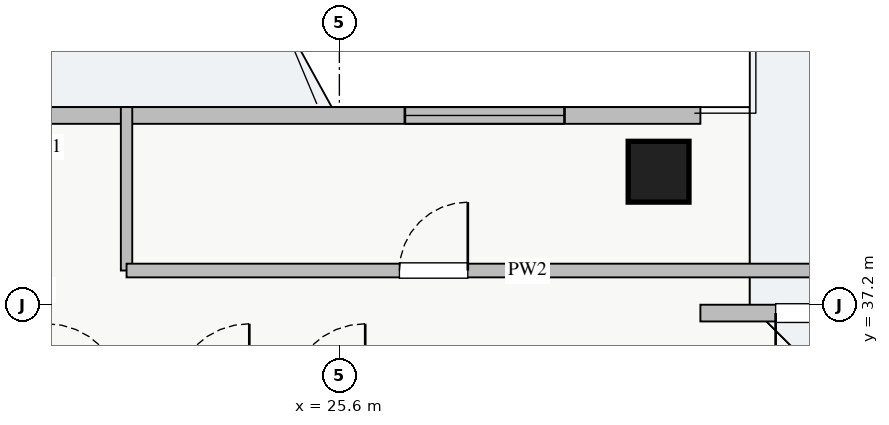
"""IFC4 building model, lengths in metres.
Left out: names, types, materials, properties, quantities, classifications, styles, units other than length and angle.
Written with IfcOpenShell. Run it as: python <this file> out.ifc"""

import sys

from ifc_helpers import new_model, si_unit, direction, frame, frame_2d, origin, origin_2d, place, context, subcontext, project, spatial, rectangle, extrude, source, transform, mapped, element, fill, save


model = new_model("IFC4")
c1 = context("Model", 3, precision=1e-05, world=origin(), true_north=direction((0.0, 1.0)))
c2 = subcontext(c1, "Body", "Model", "MODEL_VIEW")
j1 = project(units=[si_unit("LENGTHUNIT", "METRE"), si_unit("PLANEANGLEUNIT", "RADIAN")], contexts=[c1])
p1 = place(None, origin())
s1 = spatial("IfcSite", under=j1, at=p1, CompositionType="ELEMENT")
p2 = place(p1, origin())
s2 = spatial("IfcBuilding", under=s1, at=p2, CompositionType="ELEMENT")
p3 = place(p2, frame((0.0, 0.0, 223.0)))
s3 = spatial("IfcBuildingStorey", under=s2, at=p3, CompositionType="ELEMENT", Elevation=223.0)
m1 = source(origin(), c2, "Body", "SweptSolid", [
    extrude(rectangle(XDim=0.8, YDim=0.8, at=origin_2d()), origin(), (0.0, 0.0, 1.0), 3.25),
])
p4 = place(p3, frame((29.8, 38.95, 0.0), z_axis=(0.0, 0.0, 1.0), x_axis=(1.0, 0.0, 0.0)))
e1 = element("IfcColumn", 1, at=p4, inside=s3, PredefinedType="COLUMN", context=c2, shape_type="MappedRepresentation", body=[
    mapped(m1, transform((0.0, 0.0, 0.0), x_axis=(1.0, 0.0, 0.0), y_axis=(0.0, 1.0, 0.0), z_axis=(0.0, 0.0, 1.0), scale=1.0)),
])
p5 = place(p3, frame((7.65, 39.69, 0.0), z_axis=(0.0, 0.0, 1.0), x_axis=(1.0, 0.0, 0.0)))
e2 = element("IfcWall", 2, at=p5, inside=s3, PredefinedType="STANDARD", context=c2, shape_type="SweptSolid", body=[
    extrude(rectangle(XDim=22.7, YDim=0.22, at=frame_2d((11.35, 0.0))), origin(), (0.0, 0.0, 1.0), 2.61),
])
p6 = place(p5, frame((12.2, 0.0, 0.0)))
e3 = element("IfcOpeningElement", 3, at=p6, cuts=e2, PredefinedType="OPENING", context=c2, shape_type="SweptSolid", body=[
    extrude(rectangle(XDim=1.2, YDim=2.1, at=frame_2d((0.6, 1.05))), frame((0.0, 0.12, 0.0), z_axis=(0.0, -1.0, 0.0), x_axis=(1.0, 0.0, 0.0)), (0.0, 0.0, 1.0), 0.24),
])
p7 = place(p5, frame((1.637, 0.0, 0.9)))
e4 = element("IfcOpeningElement", 4, at=p7, cuts=e2, PredefinedType="OPENING", context=c2, shape_type="SweptSolid", body=[
    extrude(rectangle(XDim=2.4, YDim=1.48, at=frame_2d((1.2, 0.74))), frame((0.0, 0.12, 0.0), z_axis=(0.0, -1.0, 0.0), x_axis=(1.0, 0.0, 0.0)), (0.0, 0.0, 1.0), 0.24),
])
p8 = place(p5, frame((7.612, 0.0, 0.9)))
e5 = element("IfcOpeningElement", 5, at=p8, cuts=e2, PredefinedType="OPENING", context=c2, shape_type="SweptSolid", body=[
    extrude(rectangle(XDim=1.8, YDim=1.45, at=frame_2d((0.9, 0.725))), frame((0.0, 0.12, 0.0), z_axis=(0.0, -1.0, 0.0), x_axis=(1.0, 0.0, 0.0)), (0.0, 0.0, 1.0), 0.24),
])
p9 = place(p5, frame((18.812, 0.0, 0.9)))
e6 = element("IfcOpeningElement", 6, at=p9, cuts=e2, PredefinedType="OPENING", context=c2, shape_type="SweptSolid", body=[
    extrude(rectangle(XDim=2.1, YDim=1.48, at=frame_2d((1.05, 0.74))), frame((0.0, 0.12, 0.0), z_axis=(0.0, -1.0, 0.0), x_axis=(1.0, 0.0, 0.0)), (0.0, 0.0, 1.0), 0.24),
])
p10 = place(p3, frame((30.35, 37.09, 0.0), z_axis=(0.0, 0.0, 1.0), x_axis=(1.0, 0.0, 0.0)))
e7 = element("IfcWall", 7, at=p10, inside=s3, PredefinedType="STANDARD", context=c2, shape_type="SweptSolid", body=[
    extrude(rectangle(XDim=2.74, YDim=0.22, at=frame_2d((1.37, 0.0))), origin(), (0.0, 0.0, 1.0), 2.61),
])
p11 = place(p10, frame((0.99, 0.0, 0.0)))
e8 = element("IfcOpeningElement", 8, at=p11, cuts=e7, PredefinedType="OPENING", context=c2, shape_type="SweptSolid", body=[
    extrude(rectangle(XDim=1.2, YDim=2.1, at=frame_2d((0.6, 1.05))), frame((0.0, 0.12, 0.0), z_axis=(0.0, -1.0, 0.0), x_axis=(1.0, 0.0, 0.0)), (0.0, 0.0, 1.0), 0.24),
])
p12 = place(p3, frame((22.8, 37.65, 0.0), z_axis=(0.0, 0.0, 1.0), x_axis=(0.0, 1.0, 0.0)))
e9 = element("IfcWall", 9, at=p12, inside=s3, PredefinedType="PARTITIONING", context=c2, shape_type="SweptSolid", body=[
    extrude(rectangle(XDim=2.15, YDim=0.15, at=frame_2d((1.075, 0.0))), origin(), (0.0, 0.0, 1.0), 3.07),
])
p13 = place(p3, frame((22.8, 37.65, 0.0), z_axis=(0.0, 0.0, 1.0), x_axis=(1.0, 0.0, 0.0)))
e10 = element("IfcWall", 10, at=p13, inside=s3, PredefinedType="PARTITIONING", context=c2, shape_type="SweptSolid", body=[
    extrude(rectangle(XDim=9.65, YDim=0.18, at=frame_2d((4.825, 0.0))), origin(), (0.0, 0.0, 1.0), 3.07),
])
p14 = place(p13, frame((3.59, 0.0, 0.0)))
e11 = element("IfcOpeningElement", 11, at=p14, cuts=e10, PredefinedType="OPENING", context=c2, shape_type="SweptSolid", body=[
    extrude(rectangle(XDim=0.9, YDim=2.05, at=frame_2d((0.45, 1.025))), frame((0.0, 0.1, 0.0), z_axis=(0.0, -1.0, 0.0), x_axis=(1.0, 0.0, 0.0)), (0.0, 0.0, 1.0), 0.2),
])
m2 = source(origin(), c2, "Body", "SweptSolid", [
    extrude(rectangle(XDim=2.1, YDim=1.48, at=frame_2d((1.05, 0.74))), frame((0.0, 0.03, 0.0), z_axis=(0.0, -1.0, 0.0), x_axis=(1.0, 0.0, 0.0)), (0.0, 0.0, 1.0), 0.06),
])
p15 = place(p9, origin())
e12 = element("IfcWindow", 12, at=p15, inside=s3, PartitioningType="TRIPLE_PANEL_VERTICAL", PredefinedType="WINDOW", context=c2, shape_type="MappedRepresentation", body=[
    mapped(m2, transform((0.0, 0.0, 0.0), x_axis=(1.0, 0.0, 0.0), y_axis=(0.0, 1.0, 0.0), z_axis=(0.0, 0.0, 1.0), scale=1.0)),
])
fill(e6, e12)
m3 = source(origin(), c2, "Body", "SweptSolid", [
    extrude(rectangle(XDim=1.2, YDim=2.1, at=frame_2d((0.6, 1.05))), frame((0.0, 0.025, 0.0), z_axis=(0.0, -1.0, 0.0), x_axis=(1.0, 0.0, 0.0)), (0.0, 0.0, 1.0), 0.05),
])
p16 = place(p11, frame((1.2, 0.0, 0.0), z_axis=(0.0, 0.0, 1.0), x_axis=(-1.0, 0.0, 0.0)))
e13 = element("IfcDoor", 13, at=p16, inside=s3, OperationType="SINGLE_SWING_LEFT", PredefinedType="DOOR", context=c2, shape_type="MappedRepresentation", body=[
    mapped(m3, transform((0.0, 0.0, 0.0), x_axis=(1.0, 0.0, 0.0), y_axis=(0.0, 1.0, 0.0), z_axis=(0.0, 0.0, 1.0), scale=1.0)),
])
fill(e8, e13)
m4 = source(origin(), c2, "Body", "SweptSolid", [
    extrude(rectangle(XDim=0.9, YDim=2.05, at=frame_2d((0.45, 1.025))), frame((0.0, 0.025, 0.0), z_axis=(0.0, -1.0, 0.0), x_axis=(1.0, 0.0, 0.0)), (0.0, 0.0, 1.0), 0.05),
])
p17 = place(p14, origin())
e14 = element("IfcDoor", 14, at=p17, inside=s3, OperationType="SINGLE_SWING_RIGHT", PredefinedType="DOOR", context=c2, shape_type="MappedRepresentation", body=[
    mapped(m4, transform((0.0, 0.0, 0.0), x_axis=(1.0, 0.0, 0.0), y_axis=(0.0, 1.0, 0.0), z_axis=(0.0, 0.0, 1.0), scale=1.0)),
])
fill(e11, e14)
save(model, sys.argv[1])
